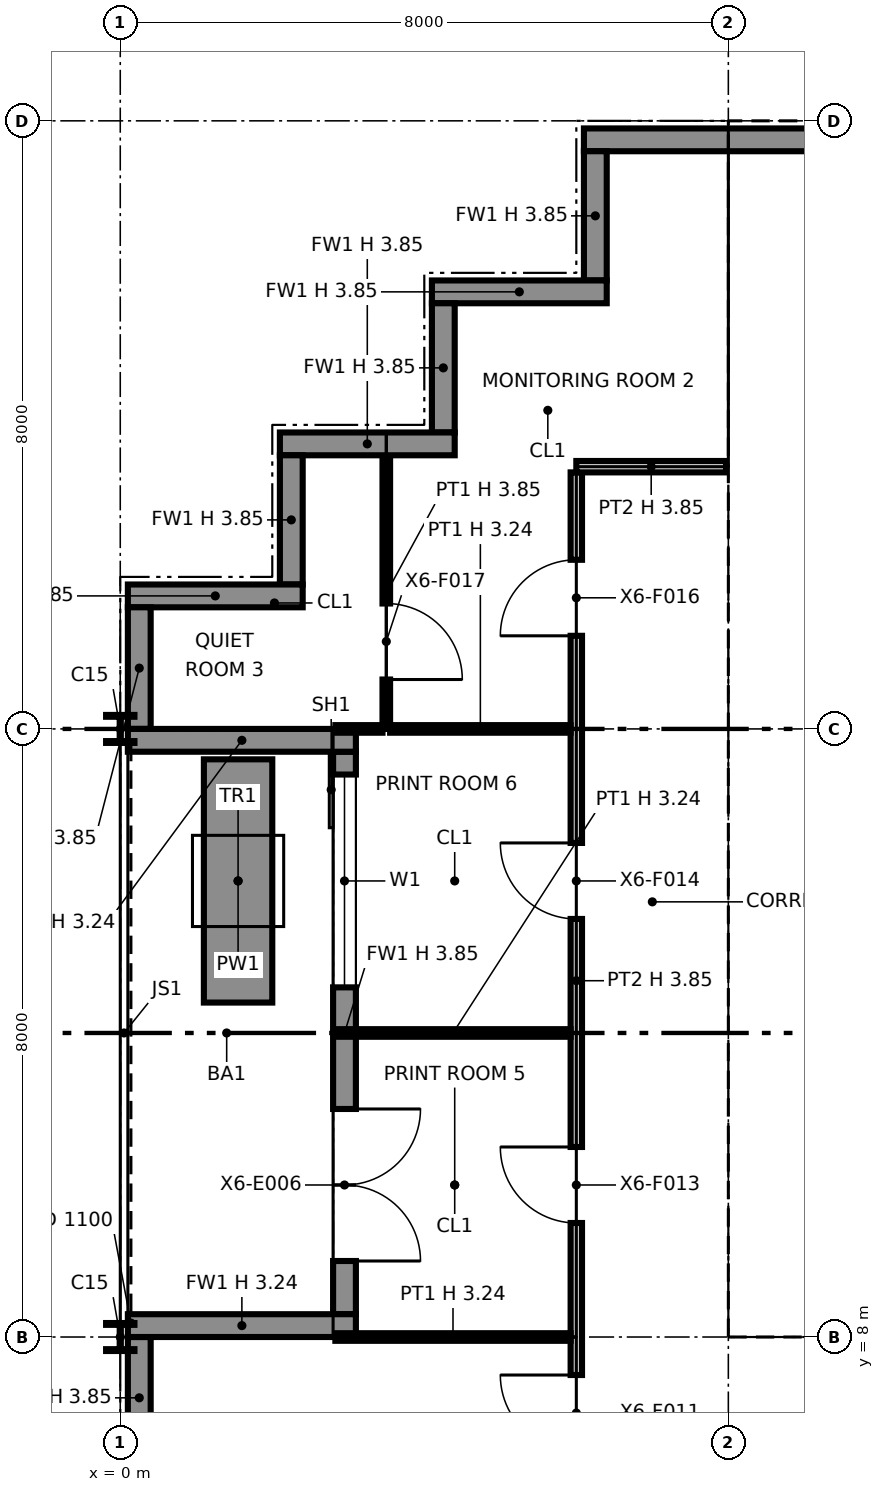
"""IFC4 building model, lengths in metres.
Left out: names, types, materials, properties, quantities, classifications, styles, units other than length and angle.
Written with IfcOpenShell. Run it as: python <this file> out.ifc"""

import sys

from ifc_helpers import new_model, si_unit, direction, frame, frame_2d, origin, origin_2d, place, context, subcontext, project, spatial, polyline, rectangle, i_section, outline, extrude, element, fill, save


model = new_model("IFC4")
c1 = context("Model", 3, precision=1e-05, world=origin(), true_north=direction((0.0, 1.0)))
c2 = subcontext(c1, "Body", "Model", "MODEL_VIEW")
j1 = project(units=[si_unit("LENGTHUNIT", "METRE"), si_unit("PLANEANGLEUNIT", "RADIAN")], contexts=[c1])
p1 = place(None, origin())
s1 = spatial("IfcSite", under=j1, at=p1, CompositionType="ELEMENT")
p2 = place(p1, origin())
s2 = spatial("IfcBuilding", under=s1, at=p2, CompositionType="ELEMENT")
p3 = place(p2, frame((0.0, 0.0, 291.0)))
s3 = spatial("IfcBuildingStorey", under=s2, at=p3, CompositionType="ELEMENT", Elevation=291.0)
for number, where, z_axis, x_axis in (
    (1, (0.0, 8.0, 0.0), (0.0, 0.0, 1.0), (1.0, 0.0, 0.0)),
    (2, (0.0, 16.0, 0.0), (0.0, 0.0, 1.0), (1.0, 0.0, 0.0)),
):
    element("IfcColumn", number, at=place(p3, frame(where, z_axis=z_axis, x_axis=x_axis)), inside=s3, PredefinedType="COLUMN", context=c2, shape_type="SweptSolid", body=[
        extrude(i_section(OverallWidth=0.373, OverallDepth=0.368, WebThickness=0.015, FlangeThickness=0.024, at=origin_2d()), origin(), (0.0, 0.0, 1.0), 3.85),
    ])
for number, where, z_axis, x_axis in (
    (3, (8.0, 8.0, 0.0), (0.0, 0.0, 1.0), (1.0, 0.0, 0.0)),
    (4, (8.0, 16.0, 0.0), (0.0, 0.0, 1.0), (1.0, 0.0, 0.0)),
):
    element("IfcColumn", number, at=place(p3, frame(where, z_axis=z_axis, x_axis=x_axis)), inside=s3, PredefinedType="COLUMN", context=c2, shape_type="SweptSolid", body=[
        extrude(i_section(OverallWidth=0.257, OverallDepth=0.363, WebThickness=0.013, FlangeThickness=0.022, at=origin_2d()), origin(), (0.0, 0.0, 1.0), 3.85),
    ])
p4 = place(p3, frame((8.0, 24.0, 0.0), z_axis=(0.0, 0.0, 1.0), x_axis=(1.0, 0.0, 0.0)))
e5 = element("IfcColumn", 5, at=p4, inside=s3, PredefinedType="COLUMN", context=c2, shape_type="SweptSolid", body=[
    extrude(i_section(OverallWidth=0.399, OverallDepth=0.386, WebThickness=0.021, FlangeThickness=0.033, at=origin_2d()), origin(), (0.0, 0.0, 1.0), 3.85),
])
p5 = place(p3, frame((32.0, 23.75, 0.0), z_axis=(0.0, 0.0, 1.0), x_axis=(-1.0, 0.0, 0.0)))
e6 = element("IfcWall", 6, at=p5, inside=s3, PredefinedType="SOLIDWALL", context=c2, shape_type="SweptSolid", body=[
    extrude(rectangle(XDim=25.9, YDim=0.3, at=frame_2d((12.95, 0.0))), origin(), (0.0, 0.0, 1.0), 3.85),
])
p6 = place(p3, frame((6.25, 23.6, 0.0), z_axis=(0.0, 0.0, 1.0), x_axis=(0.0, -1.0, 0.0)))
e7 = element("IfcWall", 7, at=p6, inside=s3, PredefinedType="SOLIDWALL", context=c2, shape_type="SweptSolid", body=[
    extrude(rectangle(XDim=1.7, YDim=0.3, at=frame_2d((0.85, 0.0))), origin(), (0.0, 0.0, 1.0), 3.85),
])
p7 = place(p3, frame((6.4, 21.75, 0.0), z_axis=(0.0, 0.0, 1.0), x_axis=(-1.0, 0.0, 0.0)))
e8 = element("IfcWall", 8, at=p7, inside=s3, PredefinedType="SOLIDWALL", context=c2, shape_type="SweptSolid", body=[
    extrude(rectangle(XDim=2.3, YDim=0.3, at=frame_2d((1.15, 0.0))), origin(), (0.0, 0.0, 1.0), 3.85),
])
p8 = place(p3, frame((4.25, 21.6, 0.0), z_axis=(0.0, 0.0, 1.0), x_axis=(0.0, -1.0, 0.0)))
e9 = element("IfcWall", 9, at=p8, inside=s3, PredefinedType="SOLIDWALL", context=c2, shape_type="SweptSolid", body=[
    extrude(rectangle(XDim=1.7, YDim=0.3, at=frame_2d((0.85, 0.0))), origin(), (0.0, 0.0, 1.0), 3.85),
])
p9 = place(p3, frame((4.4, 19.75, 0.0), z_axis=(0.0, 0.0, 1.0), x_axis=(-1.0, 0.0, 0.0)))
e10 = element("IfcWall", 10, at=p9, inside=s3, PredefinedType="SOLIDWALL", context=c2, shape_type="SweptSolid", body=[
    extrude(rectangle(XDim=2.3, YDim=0.3, at=frame_2d((1.15, 0.0))), origin(), (0.0, 0.0, 1.0), 3.85),
])
p10 = place(p3, frame((2.25, 19.6, 0.0), z_axis=(0.0, 0.0, 1.0), x_axis=(0.0, -1.0, 0.0)))
e11 = element("IfcWall", 11, at=p10, inside=s3, PredefinedType="SOLIDWALL", context=c2, shape_type="SweptSolid", body=[
    extrude(rectangle(XDim=1.7, YDim=0.3, at=frame_2d((0.85, 0.0))), origin(), (0.0, 0.0, 1.0), 3.85),
])
p11 = place(p3, frame((2.4, 17.75, 0.0), z_axis=(0.0, 0.0, 1.0), x_axis=(-1.0, 0.0, 0.0)))
e12 = element("IfcWall", 12, at=p11, inside=s3, PredefinedType="SOLIDWALL", context=c2, shape_type="SweptSolid", body=[
    extrude(rectangle(XDim=2.3, YDim=0.3, at=frame_2d((1.15, 0.0))), origin(), (0.0, 0.0, 1.0), 3.85),
])
p12 = place(p3, frame((0.25, 17.6, 0.0), z_axis=(0.0, 0.0, 1.0), x_axis=(0.0, -1.0, 0.0)))
e13 = element("IfcWall", 13, at=p12, inside=s3, PredefinedType="SOLIDWALL", context=c2, shape_type="SweptSolid", body=[
    extrude(rectangle(XDim=1.6, YDim=0.3, at=frame_2d((0.8, 0.0))), origin(), (0.0, 0.0, 1.0), 3.85),
])
p13 = place(p3, frame((2.95, 15.7, 0.0), z_axis=(0.0, 0.0, 1.0), x_axis=(0.0, -1.0, 0.0)))
e14 = element("IfcWall", 14, at=p13, inside=s3, PredefinedType="SOLIDWALL", context=c2, shape_type="SweptSolid", body=[
    extrude(rectangle(XDim=7.4, YDim=0.3, at=frame_2d((3.7, 0.0))), origin(), (0.0, 0.0, 1.0), 3.85),
])
p14 = place(p13, frame((0.3, 0.0, 0.9)))
e15 = element("IfcOpeningElement", 15, at=p14, cuts=e14, PredefinedType="OPENING", context=c2, shape_type="SweptSolid", body=[
    extrude(rectangle(XDim=2.8, YDim=2.2, at=frame_2d((1.4, 1.1))), frame((0.0, 0.16, 0.0), z_axis=(0.0, -1.0, 0.0), x_axis=(1.0, 0.0, 0.0)), (0.0, 0.0, 1.0), 0.32),
])
p15 = place(p13, frame((4.7, 0.0, 0.0)))
e16 = element("IfcOpeningElement", 16, at=p15, cuts=e14, PredefinedType="OPENING", context=c2, shape_type="SweptSolid", body=[
    extrude(rectangle(XDim=2.0, YDim=2.4, at=frame_2d((1.0, 1.2))), frame((0.0, 0.16, 0.0), z_axis=(0.0, -1.0, 0.0), x_axis=(1.0, 0.0, 0.0)), (0.0, 0.0, 1.0), 0.32),
])
for number, where, z_axis, x_axis in (
    (17, (0.1, 15.85, 0.0), (0.0, 0.0, 1.0), (1.0, 0.0, 0.0)),
    (18, (0.1, 8.15, 0.0), (0.0, 0.0, 1.0), (1.0, 0.0, 0.0)),
):
    element("IfcWall", number, at=place(p3, frame(where, z_axis=z_axis, x_axis=x_axis)), inside=s3, PredefinedType="SOLIDWALL", context=c2, shape_type="SweptSolid", body=[
        extrude(rectangle(XDim=3.0, YDim=0.3, at=frame_2d((1.5, 0.0))), origin(), (0.0, 0.0, 1.0), 3.237),
    ])
p16 = place(p3, frame((0.25, 8.0, 0.0), z_axis=(0.0, 0.0, 1.0), x_axis=(0.0, -1.0, 0.0)))
e19 = element("IfcWall", 19, at=p16, inside=s3, PredefinedType="SOLIDWALL", context=c2, shape_type="SweptSolid", body=[
    extrude(rectangle(XDim=1.6, YDim=0.3, at=frame_2d((0.8, 0.0))), origin(), (0.0, 0.0, 1.0), 3.85),
])
p17 = place(p3, frame((1.55, 15.6, 0.0), z_axis=(0.0, 0.0, 1.0), x_axis=(0.0, -1.0, 0.0)))
e20 = element("IfcWall", 20, at=p17, inside=s3, PredefinedType="SOLIDWALL", context=c2, shape_type="SweptSolid", body=[
    extrude(rectangle(XDim=3.2, YDim=0.9, at=frame_2d((1.6, 0.0))), origin(), (0.0, 0.0, 1.0), 0.6),
])
p18 = place(p3, frame((8.65, 8.75, 0.0), z_axis=(0.0, 0.0, 1.0), x_axis=(1.0, 0.0, 0.0)))
e21 = element("IfcWall", 21, at=p18, inside=s3, PredefinedType="PARTITIONING", context=c2, shape_type="SweptSolid", body=[
    extrude(outline(polyline([(0.0, 0.0), (14.7, 0.0), (14.7, 3.85), (7.438, 3.85), (7.437, 3.318), (7.263, 3.318), (7.262, 3.85), (0.0, 3.85), (0.0, 0.0)])), frame((0.0, 0.1, 0.0), z_axis=(0.0, -1.0, 0.0), x_axis=(1.0, 0.0, 0.0)), (0.0, 0.0, 1.0), 0.2),
])
p19 = place(p18, frame((1.3, 0.0, 0.0)))
e22 = element("IfcOpeningElement", 22, at=p19, cuts=e21, PredefinedType="OPENING", context=c2, shape_type="SweptSolid", body=[
    extrude(rectangle(XDim=1.4, YDim=2.1, at=frame_2d((0.7, 1.05))), frame((0.0, 0.11, 0.0), z_axis=(0.0, -1.0, 0.0), x_axis=(1.0, 0.0, 0.0)), (0.0, 0.0, 1.0), 0.22),
])
p20 = place(p18, frame((4.6, 0.0, 0.0)))
e23 = element("IfcOpeningElement", 23, at=p20, cuts=e21, PredefinedType="OPENING", context=c2, shape_type="SweptSolid", body=[
    extrude(rectangle(XDim=1.4, YDim=2.1, at=frame_2d((0.7, 1.05))), frame((0.0, 0.11, 0.0), z_axis=(0.0, -1.0, 0.0), x_axis=(1.0, 0.0, 0.0)), (0.0, 0.0, 1.0), 0.22),
])
p21 = place(p18, frame((10.4, 0.0, 0.0)))
e24 = element("IfcOpeningElement", 24, at=p21, cuts=e21, PredefinedType="OPENING", context=c2, shape_type="SweptSolid", body=[
    extrude(rectangle(XDim=1.2, YDim=2.1, at=frame_2d((0.6, 1.05))), frame((0.0, 0.11, 0.0), z_axis=(0.0, -1.0, 0.0), x_axis=(1.0, 0.0, 0.0)), (0.0, 0.0, 1.0), 0.22),
])
p22 = place(p3, frame((8.75, 8.85, 0.0), z_axis=(0.0, 0.0, 1.0), x_axis=(0.0, 1.0, 0.0)))
e25 = element("IfcWall", 25, at=p22, inside=s3, PredefinedType="PARTITIONING", context=c2, shape_type="SweptSolid", body=[
    extrude(outline(polyline([(0.0, 0.0), (14.3, 0.0), (14.3, 3.85), (10.225, 3.85), (10.224, 3.44), (10.076, 3.44), (10.075, 3.85), (7.238, 3.85), (7.237, 3.318), (7.063, 3.318), (7.062, 3.85), (0.0, 3.85), (0.0, 0.0)])), frame((0.0, 0.1, 0.0), z_axis=(0.0, -1.0, 0.0), x_axis=(1.0, 0.0, 0.0)), (0.0, 0.0, 1.0), 0.2),
])
p23 = place(p22, frame((8.3, 0.0, 0.0)))
e26 = element("IfcOpeningElement", 26, at=p23, cuts=e25, PredefinedType="OPENING", context=c2, shape_type="SweptSolid", body=[
    extrude(rectangle(XDim=1.8, YDim=2.1, at=frame_2d((0.9, 1.05))), frame((0.0, 0.11, 0.0), z_axis=(0.0, -1.0, 0.0), x_axis=(1.0, 0.0, 0.0)), (0.0, 0.0, 1.0), 0.22),
])
p24 = place(p3, frame((8.65, 23.25, 0.0), z_axis=(0.0, 0.0, 1.0), x_axis=(1.0, 0.0, 0.0)))
e27 = element("IfcWall", 27, at=p24, inside=s3, PredefinedType="PARTITIONING", context=c2, shape_type="SweptSolid", body=[
    extrude(outline(polyline([(0.0, 0.0), (14.7, 0.0), (14.7, 3.85), (7.438, 3.85), (7.437, 3.318), (7.263, 3.318), (7.262, 3.85), (0.0, 3.85), (0.0, 0.0)])), frame((0.0, 0.1, 0.0), z_axis=(0.0, -1.0, 0.0), x_axis=(1.0, 0.0, 0.0)), (0.0, 0.0, 1.0), 0.2),
])
p25 = place(p3, frame((8.85, 16.0, 0.0), z_axis=(0.0, 0.0, 1.0), x_axis=(1.0, 0.0, 0.0)))
e28 = element("IfcWall", 28, at=p25, inside=s3, PredefinedType="PARTITIONING", context=c2, shape_type="SweptSolid", body=[
    extrude(rectangle(XDim=6.958, YDim=0.6, at=frame_2d((3.479, 0.0))), origin(), (0.0, 0.0, 1.0), 3.318),
])
p26 = place(p3, frame((8.85, 19.9, 0.0), z_axis=(0.0, 0.0, 1.0), x_axis=(1.0, 0.0, 0.0)))
e29 = element("IfcWall", 29, at=p26, inside=s3, PredefinedType="PARTITIONING", context=c2, shape_type="SweptSolid", body=[
    extrude(outline(polyline([(0.0, 0.0), (14.3, 0.0), (14.3, 3.85), (7.238, 3.85), (7.237, 3.318), (7.063, 3.318), (7.062, 3.85), (0.0, 3.85), (0.0, 0.0)])), frame((0.0, 0.1, 0.0), z_axis=(0.0, -1.0, 0.0), x_axis=(1.0, 0.0, 0.0)), (0.0, 0.0, 1.0), 0.2),
])
p27 = place(p26, frame((2.125, 0.0, 0.0)))
e30 = element("IfcOpeningElement", 30, at=p27, cuts=e29, PredefinedType="OPENING", context=c2, shape_type="SweptSolid", body=[
    extrude(rectangle(XDim=0.9, YDim=2.1, at=frame_2d((0.45, 1.05))), frame((0.0, 0.11, 0.0), z_axis=(0.0, -1.0, 0.0), x_axis=(1.0, 0.0, 0.0)), (0.0, 0.0, 1.0), 0.22),
])
p28 = place(p26, frame((5.65, 0.0, 0.0)))
e31 = element("IfcOpeningElement", 31, at=p28, cuts=e29, PredefinedType="OPENING", context=c2, shape_type="SweptSolid", body=[
    extrude(rectangle(XDim=1.1, YDim=2.1, at=frame_2d((0.55, 1.05))), frame((0.0, 0.11, 0.0), z_axis=(0.0, -1.0, 0.0), x_axis=(1.0, 0.0, 0.0)), (0.0, 0.0, 1.0), 0.22),
])
p29 = place(p26, frame((7.95, 0.0, 0.0)))
e32 = element("IfcOpeningElement", 32, at=p29, cuts=e29, PredefinedType="OPENING", context=c2, shape_type="SweptSolid", body=[
    extrude(rectangle(XDim=1.1, YDim=2.1, at=frame_2d((0.55, 1.05))), frame((0.0, 0.11, 0.0), z_axis=(0.0, -1.0, 0.0), x_axis=(1.0, 0.0, 0.0)), (0.0, 0.0, 1.0), 0.22),
])
p30 = place(p26, frame((10.25, 0.0, 0.0)))
e33 = element("IfcOpeningElement", 33, at=p30, cuts=e29, PredefinedType="OPENING", context=c2, shape_type="SweptSolid", body=[
    extrude(rectangle(XDim=1.1, YDim=2.1, at=frame_2d((0.55, 1.05))), frame((0.0, 0.11, 0.0), z_axis=(0.0, -1.0, 0.0), x_axis=(1.0, 0.0, 0.0)), (0.0, 0.0, 1.0), 0.22),
])
p31 = place(p26, frame((12.625, 0.0, 0.0)))
e34 = element("IfcOpeningElement", 34, at=p31, cuts=e29, PredefinedType="OPENING", context=c2, shape_type="SweptSolid", body=[
    extrude(rectangle(XDim=1.1, YDim=2.1, at=frame_2d((0.55, 1.05))), frame((0.0, 0.11, 0.0), z_axis=(0.0, -1.0, 0.0), x_axis=(1.0, 0.0, 0.0)), (0.0, 0.0, 1.0), 0.22),
])
p32 = place(p3, frame((6.0, 6.0, 0.0), z_axis=(0.0, 0.0, 1.0), x_axis=(0.0, 1.0, 0.0)))
e35 = element("IfcWall", 35, at=p32, inside=s3, PredefinedType="PARTITIONING", context=c2, shape_type="SweptSolid", body=[
    extrude(outline(polyline([(0.0, 0.0), (13.375, 0.0), (13.375, 3.85), (10.3, 3.85), (10.298, 3.238), (9.702, 3.238), (9.7, 3.85), (6.3, 3.85), (6.298, 3.238), (5.702, 3.238), (5.7, 3.85), (2.3, 3.85), (2.298, 3.238), (1.702, 3.238), (1.7, 3.85), (0.0, 3.85), (0.0, 0.0)])), frame((0.0, 0.075, 0.0), z_axis=(0.0, -1.0, 0.0), x_axis=(1.0, 0.0, 0.0)), (0.0, 0.0, 1.0), 0.15),
])
p33 = place(p32, frame((0.5, 0.0, 0.0)))
e36 = element("IfcOpeningElement", 36, at=p33, cuts=e35, PredefinedType="OPENING", context=c2, shape_type="SweptSolid", body=[
    extrude(rectangle(XDim=1.0, YDim=2.1, at=frame_2d((0.5, 1.05))), frame((0.0, 0.085, 0.0), z_axis=(0.0, -1.0, 0.0), x_axis=(1.0, 0.0, 0.0)), (0.0, 0.0, 1.0), 0.17),
])
p34 = place(p32, frame((3.5, 0.0, 0.0)))
e37 = element("IfcOpeningElement", 37, at=p34, cuts=e35, PredefinedType="OPENING", context=c2, shape_type="SweptSolid", body=[
    extrude(rectangle(XDim=1.0, YDim=2.1, at=frame_2d((0.5, 1.05))), frame((0.0, 0.085, 0.0), z_axis=(0.0, -1.0, 0.0), x_axis=(1.0, 0.0, 0.0)), (0.0, 0.0, 1.0), 0.17),
])
p35 = place(p32, frame((7.5, 0.0, 0.0)))
e38 = element("IfcOpeningElement", 38, at=p35, cuts=e35, PredefinedType="OPENING", context=c2, shape_type="SweptSolid", body=[
    extrude(rectangle(XDim=1.0, YDim=2.1, at=frame_2d((0.5, 1.05))), frame((0.0, 0.085, 0.0), z_axis=(0.0, -1.0, 0.0), x_axis=(1.0, 0.0, 0.0)), (0.0, 0.0, 1.0), 0.17),
])
p36 = place(p32, frame((11.225, 0.0, 0.0)))
e39 = element("IfcOpeningElement", 39, at=p36, cuts=e35, PredefinedType="OPENING", context=c2, shape_type="SweptSolid", body=[
    extrude(rectangle(XDim=1.0, YDim=2.1, at=frame_2d((0.5, 1.05))), frame((0.0, 0.085, 0.0), z_axis=(0.0, -1.0, 0.0), x_axis=(1.0, 0.0, 0.0)), (0.0, 0.0, 1.0), 0.17),
])
for number, where, z_axis, x_axis in (
    (40, (2.83, 8.0, 0.0), (0.0, 0.0, 1.0), (1.0, 0.0, 0.0)),
    (41, (2.83, 12.0, 0.0), (0.0, 0.0, 1.0), (1.0, 0.0, 0.0)),
):
    element("IfcWall", number, at=place(p3, frame(where, z_axis=z_axis, x_axis=x_axis)), inside=s3, PredefinedType="PARTITIONING", context=c2, shape_type="SweptSolid", body=[
        extrude(rectangle(XDim=3.095, YDim=0.1, at=frame_2d((1.547, 0.0))), origin(), (0.0, 0.0, 1.0), 3.238),
    ])
p37 = place(p3, frame((2.83, 16.0, 0.0), z_axis=(0.0, 0.0, 1.0), x_axis=(1.0, 0.0, 0.0)))
e42 = element("IfcWall", 42, at=p37, inside=s3, PredefinedType="PARTITIONING", context=c2, shape_type="SweptSolid", body=[
    extrude(rectangle(XDim=0.62, YDim=0.1, at=frame_2d((0.31, 0.0))), origin(), (0.0, 0.0, 1.0), 3.238),
])
p38 = place(p3, frame((3.55, 16.0, 0.0), z_axis=(0.0, 0.0, 1.0), x_axis=(1.0, 0.0, 0.0)))
e43 = element("IfcWall", 43, at=p38, inside=s3, PredefinedType="PARTITIONING", context=c2, shape_type="SweptSolid", body=[
    extrude(rectangle(XDim=2.375, YDim=0.1, at=frame_2d((1.188, 0.0))), origin(), (0.0, 0.0, 1.0), 3.238),
])
p39 = place(p3, frame((3.5, 16.0, 0.0), z_axis=(0.0, 0.0, 1.0), x_axis=(0.0, 1.0, 0.0)))
e44 = element("IfcWall", 44, at=p39, inside=s3, PredefinedType="PARTITIONING", context=c2, shape_type="SweptSolid", body=[
    extrude(rectangle(XDim=3.57, YDim=0.1, at=frame_2d((1.785, 0.0))), origin(), (0.0, 0.0, 1.0), 3.85),
])
p40 = place(p39, frame((1.65, 0.0, 0.0), z_axis=(0.0, 0.0, 1.0), x_axis=(-1.0, 0.0, 0.0)))
e45 = element("IfcOpeningElement", 45, at=p40, cuts=e44, PredefinedType="OPENING", context=c2, shape_type="SweptSolid", body=[
    extrude(rectangle(XDim=1.0, YDim=2.1, at=frame_2d((0.5, 1.05))), frame((0.0, 0.06, 0.0), z_axis=(0.0, -1.0, 0.0), x_axis=(1.0, 0.0, 0.0)), (0.0, 0.0, 1.0), 0.12),
])
p41 = place(p3, frame((6.0, 19.45, 0.0), z_axis=(0.0, 0.0, 1.0), x_axis=(1.0, 0.0, 0.0)))
e46 = element("IfcWall", 46, at=p41, inside=s3, PredefinedType="PARTITIONING", context=c2, shape_type="SweptSolid", body=[
    extrude(rectangle(XDim=1.97, YDim=0.15, at=frame_2d((0.985, 0.0))), origin(), (0.0, 0.0, 1.0), 3.85),
])
p42 = place(p14, origin())
e47 = element("IfcWindow", 47, at=p42, inside=s3, PartitioningType="SINGLE_PANEL", PredefinedType="WINDOW", context=c2, shape_type="SweptSolid", body=[
    extrude(rectangle(XDim=2.8, YDim=2.2, at=frame_2d((1.4, 1.1))), frame((0.0, 0.03, 0.0), z_axis=(0.0, -1.0, 0.0), x_axis=(1.0, 0.0, 0.0)), (0.0, 0.0, 1.0), 0.06),
])
fill(e15, e47)
p43 = place(p15, origin())
e48 = element("IfcDoor", 48, at=p43, inside=s3, OperationType="DOUBLE_DOOR_SINGLE_SWING", PredefinedType="DOOR", context=c2, shape_type="SweptSolid", body=[
    extrude(rectangle(XDim=2.0, YDim=2.4, at=frame_2d((1.0, 1.2))), frame((0.0, 0.025, 0.0), z_axis=(0.0, -1.0, 0.0), x_axis=(1.0, 0.0, 0.0)), (0.0, 0.0, 1.0), 0.05),
])
fill(e16, e48)
p44 = place(p23, origin())
e49 = element("IfcDoor", 49, at=p44, inside=s3, OperationType="DOUBLE_DOOR_SINGLE_SWING", PredefinedType="NOTDEFINED", context=c2, shape_type="SweptSolid", body=[
    extrude(rectangle(XDim=1.8, YDim=2.1, at=frame_2d((0.9, 1.05))), frame((0.0, 0.025, 0.0), z_axis=(0.0, -1.0, 0.0), x_axis=(1.0, 0.0, 0.0)), (0.0, 0.0, 1.0), 0.05),
])
fill(e26, e49)
p45 = place(p33, origin())
e50 = element("IfcDoor", 50, at=p45, inside=s3, OperationType="SINGLE_SWING_RIGHT", PredefinedType="DOOR", context=c2, shape_type="SweptSolid", body=[
    extrude(rectangle(XDim=1.0, YDim=2.1, at=frame_2d((0.5, 1.05))), frame((0.0, 0.025, 0.0), z_axis=(0.0, -1.0, 0.0), x_axis=(1.0, 0.0, 0.0)), (0.0, 0.0, 1.0), 0.05),
])
fill(e36, e50)
p46 = place(p34, origin())
e51 = element("IfcDoor", 51, at=p46, inside=s3, OperationType="SINGLE_SWING_RIGHT", PredefinedType="DOOR", context=c2, shape_type="SweptSolid", body=[
    extrude(rectangle(XDim=1.0, YDim=2.1, at=frame_2d((0.5, 1.05))), frame((0.0, 0.025, 0.0), z_axis=(0.0, -1.0, 0.0), x_axis=(1.0, 0.0, 0.0)), (0.0, 0.0, 1.0), 0.05),
])
fill(e37, e51)
p47 = place(p35, origin())
e52 = element("IfcDoor", 52, at=p47, inside=s3, OperationType="SINGLE_SWING_RIGHT", PredefinedType="DOOR", context=c2, shape_type="SweptSolid", body=[
    extrude(rectangle(XDim=1.0, YDim=2.1, at=frame_2d((0.5, 1.05))), frame((0.0, 0.025, 0.0), z_axis=(0.0, -1.0, 0.0), x_axis=(1.0, 0.0, 0.0)), (0.0, 0.0, 1.0), 0.05),
])
fill(e38, e52)
p48 = place(p36, origin())
e53 = element("IfcDoor", 53, at=p48, inside=s3, OperationType="SINGLE_SWING_LEFT", PredefinedType="DOOR", context=c2, shape_type="SweptSolid", body=[
    extrude(rectangle(XDim=1.0, YDim=2.1, at=frame_2d((0.5, 1.05))), frame((0.0, 0.025, 0.0), z_axis=(0.0, -1.0, 0.0), x_axis=(1.0, 0.0, 0.0)), (0.0, 0.0, 1.0), 0.05),
])
fill(e39, e53)
p49 = place(p40, origin())
e54 = element("IfcDoor", 54, at=p49, inside=s3, OperationType="SINGLE_SWING_RIGHT", PredefinedType="DOOR", context=c2, shape_type="SweptSolid", body=[
    extrude(rectangle(XDim=1.0, YDim=2.1, at=frame_2d((0.5, 1.05))), frame((0.0, 0.025, 0.0), z_axis=(0.0, -1.0, 0.0), x_axis=(1.0, 0.0, 0.0)), (0.0, 0.0, 1.0), 0.05),
])
fill(e45, e54)
save(model, sys.argv[1])
